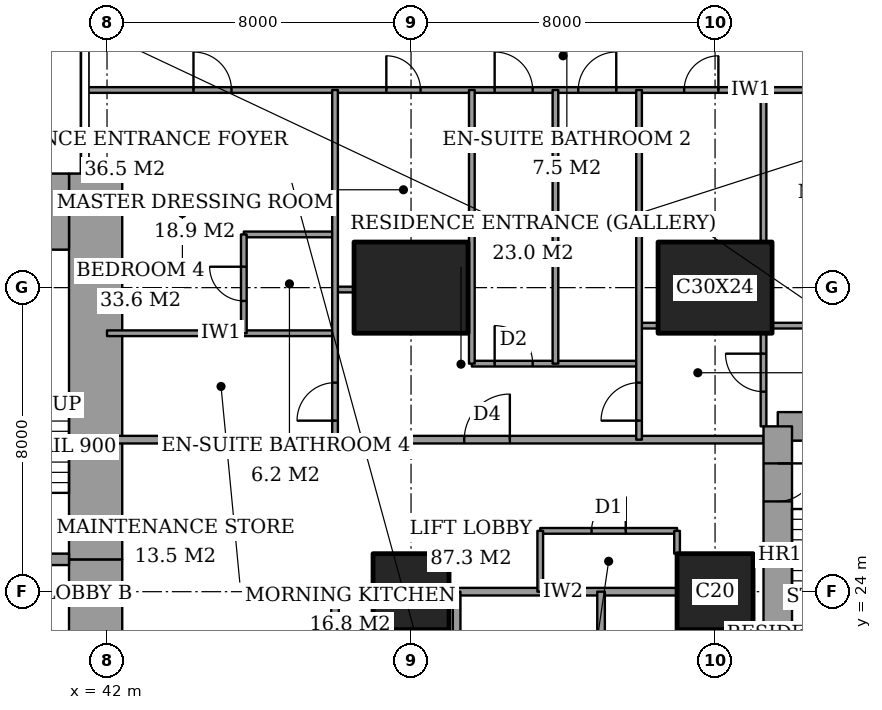
"""IFC4 building model, lengths in metres.
Left out: names, types, materials, properties, quantities, classifications, styles, units other than length and angle.
Written with IfcOpenShell. Run it as: python <this file> out.ifc"""

import sys

from ifc_helpers import new_model, si_unit, direction, frame, frame_2d, origin, origin_2d, place, context, subcontext, project, spatial, rectangle, extrude, element, fill, save


model = new_model("IFC4")
c1 = context("Model", 3, precision=1e-05, world=origin(), true_north=direction((0.0, 1.0)))
c2 = subcontext(c1, "Body", "Model", "MODEL_VIEW")
j1 = project(units=[si_unit("LENGTHUNIT", "METRE"), si_unit("PLANEANGLEUNIT", "RADIAN")], contexts=[c1])
p1 = place(None, origin())
s1 = spatial("IfcSite", under=j1, at=p1, CompositionType="ELEMENT")
p2 = place(p1, origin())
s2 = spatial("IfcBuilding", under=s1, at=p2, CompositionType="ELEMENT")
p3 = place(p2, frame((0.0, 0.0, 146.6)))
s3 = spatial("IfcBuildingStorey", under=s2, at=p3, CompositionType="ELEMENT", Elevation=146.6)
p4 = place(p3, frame((50.0, 24.0, 0.0), z_axis=(0.0, 0.0, 1.0), x_axis=(1.0, 0.0, 0.0)))
e1 = element("IfcColumn", 1, at=p4, inside=s3, PredefinedType="COLUMN", context=c2, shape_type="SweptSolid", body=[
    extrude(rectangle(XDim=2.0, YDim=2.0, at=origin_2d()), origin(), (0.0, 0.0, 1.0), 3.6),
])
p5 = place(p3, frame((50.0, 32.0, 0.0), z_axis=(0.0, 0.0, 1.0), x_axis=(1.0, 0.0, 0.0)))
e2 = element("IfcColumn", 2, at=p5, inside=s3, PredefinedType="COLUMN", context=c2, shape_type="SweptSolid", body=[
    extrude(rectangle(XDim=3.0, YDim=2.4, at=origin_2d()), origin(), (0.0, 0.0, 1.0), 3.6),
])
p6 = place(p3, frame((58.0, 24.0, 0.0), z_axis=(0.0, 0.0, 1.0), x_axis=(1.0, 0.0, 0.0)))
e3 = element("IfcColumn", 3, at=p6, inside=s3, PredefinedType="COLUMN", context=c2, shape_type="SweptSolid", body=[
    extrude(rectangle(XDim=2.0, YDim=2.0, at=origin_2d()), origin(), (0.0, 0.0, 1.0), 3.6),
])
p7 = place(p3, frame((58.0, 32.0, 0.0), z_axis=(0.0, 0.0, 1.0), x_axis=(1.0, 0.0, 0.0)))
e4 = element("IfcColumn", 4, at=p7, inside=s3, PredefinedType="COLUMN", context=c2, shape_type="SweptSolid", body=[
    extrude(rectangle(XDim=3.0, YDim=2.4, at=origin_2d()), origin(), (0.0, 0.0, 1.0), 3.6),
])
p8 = place(p3, frame((37.85, 34.0, 0.0), z_axis=(0.0, 0.0, 1.0), x_axis=(1.0, 0.0, 0.0)))
e5 = element("IfcWall", 5, at=p8, inside=s3, PredefinedType="SHEAR", context=c2, shape_type="SweptSolid", body=[
    extrude(rectangle(XDim=3.15, YDim=2.0, at=frame_2d((1.575, 0.0))), origin(), (0.0, 0.0, 1.0), 3.6),
])
p9 = place(p3, frame((41.7, 13.0, 0.0), z_axis=(0.0, 0.0, 1.0), x_axis=(0.0, 1.0, 0.0)))
e6 = element("IfcWall", 6, at=p9, inside=s3, PredefinedType="SHEAR", context=c2, shape_type="SweptSolid", body=[
    extrude(rectangle(XDim=11.85, YDim=1.4, at=frame_2d((5.925, 0.0))), origin(), (0.0, 0.0, 1.0), 3.6),
])
p10 = place(p9, frame((7.5, 0.0, 0.0)))
e7 = element("IfcOpeningElement", 7, at=p10, cuts=e6, PredefinedType="OPENING", context=c2, shape_type="SweptSolid", body=[
    extrude(rectangle(XDim=1.8, YDim=2.4, at=frame_2d((0.9, 1.2))), frame((0.0, 0.71, 0.0), z_axis=(0.0, -1.0, 0.0), x_axis=(1.0, 0.0, 0.0)), (0.0, 0.0, 1.0), 1.42),
])
p11 = place(p3, frame((41.7, 24.85, 0.0), z_axis=(0.0, 0.0, 1.0), x_axis=(0.0, 1.0, 0.0)))
e8 = element("IfcWall", 8, at=p11, inside=s3, PredefinedType="SHEAR", context=c2, shape_type="SweptSolid", body=[
    extrude(rectangle(XDim=10.15, YDim=1.4, at=frame_2d((5.075, 0.0))), origin(), (0.0, 0.0, 1.0), 3.6),
])
p12 = place(p3, frame((37.85, 24.85, 0.0), z_axis=(0.0, 0.0, 1.0), x_axis=(1.0, 0.0, 0.0)))
e9 = element("IfcWall", 9, at=p12, inside=s3, PredefinedType="SHEAR", context=c2, shape_type="SweptSolid", body=[
    extrude(rectangle(XDim=3.15, YDim=0.3, at=frame_2d((1.575, 0.0))), origin(), (0.0, 0.0, 1.0), 3.6),
])
p13 = place(p12, frame((0.95, 0.0, 0.0)))
e10 = element("IfcOpeningElement", 10, at=p13, cuts=e9, PredefinedType="OPENING", context=c2, shape_type="SweptSolid", body=[
    extrude(rectangle(XDim=1.0, YDim=2.1, at=frame_2d((0.5, 1.05))), frame((0.0, 0.16, 0.0), z_axis=(0.0, -1.0, 0.0), x_axis=(1.0, 0.0, 0.0)), (0.0, 0.0, 1.0), 0.32),
])
p14 = place(p3, frame((64.1, 28.35, 0.0), z_axis=(0.0, 0.0, 1.0), x_axis=(-1.0, 0.0, 0.0)))
e11 = element("IfcWall", 11, at=p14, inside=s3, PredefinedType="SHEAR", context=c2, shape_type="SweptSolid", body=[
    extrude(rectangle(XDim=4.45, YDim=0.75, at=frame_2d((2.225, 0.0))), origin(), (0.0, 0.0, 1.0), 3.6),
])
p15 = place(p3, frame((59.65, 28.35, 0.0), z_axis=(0.0, 0.0, 1.0), x_axis=(0.0, -1.0, 0.0)))
e12 = element("IfcWall", 12, at=p15, inside=s3, PredefinedType="SHEAR", context=c2, shape_type="SweptSolid", body=[
    extrude(rectangle(XDim=8.7, YDim=0.75, at=frame_2d((4.35, 0.0))), origin(), (0.0, 0.0, 1.0), 3.6),
])
p16 = place(p15, frame((0.975, 0.0, 0.0)))
e13 = element("IfcOpeningElement", 13, at=p16, cuts=e12, PredefinedType="OPENING", context=c2, shape_type="SweptSolid", body=[
    extrude(rectangle(XDim=1.0, YDim=2.1, at=frame_2d((0.5, 1.05))), frame((0.0, 0.385, 0.0), z_axis=(0.0, -1.0, 0.0), x_axis=(1.0, 0.0, 0.0)), (0.0, 0.0, 1.0), 0.77),
])
p17 = place(p3, frame((48.0, 24.0, 0.0), z_axis=(0.0, 0.0, 1.0), x_axis=(1.0, 0.0, 0.0)))
e14 = element("IfcWall", 14, at=p17, inside=s3, PredefinedType="PARTITIONING", context=c2, shape_type="SweptSolid", body=[
    extrude(rectangle(XDim=1.0, YDim=0.2, at=frame_2d((0.5, 0.0))), origin(), (0.0, 0.0, 1.0), 3.35),
])
p18 = place(p3, frame((51.0, 24.0, 0.0), z_axis=(0.0, 0.0, 1.0), x_axis=(1.0, 0.0, 0.0)))
e15 = element("IfcWall", 15, at=p18, inside=s3, PredefinedType="PARTITIONING", context=c2, shape_type="SweptSolid", body=[
    extrude(rectangle(XDim=6.0, YDim=0.2, at=frame_2d((3.0, 0.0))), origin(), (0.0, 0.0, 1.0), 3.35),
])
p19 = place(p3, frame((53.4, 25.6, 0.0), z_axis=(0.0, 0.0, 1.0), x_axis=(1.0, 0.0, 0.0)))
e16 = element("IfcWall", 16, at=p19, inside=s3, PredefinedType="PARTITIONING", context=c2, shape_type="SweptSolid", body=[
    extrude(rectangle(XDim=3.6, YDim=0.15, at=frame_2d((1.8, 0.0))), origin(), (0.0, 0.0, 1.0), 3.35),
])
p20 = place(p19, frame((1.35, 0.0, 0.0)))
e17 = element("IfcOpeningElement", 17, at=p20, cuts=e16, PredefinedType="OPENING", context=c2, shape_type="SweptSolid", body=[
    extrude(rectangle(XDim=0.9, YDim=2.1, at=frame_2d((0.45, 1.05))), frame((0.0, 0.085, 0.0), z_axis=(0.0, -1.0, 0.0), x_axis=(1.0, 0.0, 0.0)), (0.0, 0.0, 1.0), 0.17),
])
p21 = place(p3, frame((42.0, 28.0, 0.0), z_axis=(0.0, 0.0, 1.0), x_axis=(1.0, 0.0, 0.0)))
e18 = element("IfcWall", 18, at=p21, inside=s3, PredefinedType="PARTITIONING", context=c2, shape_type="SweptSolid", body=[
    extrude(rectangle(XDim=17.275, YDim=0.2, at=frame_2d((8.637, 0.0))), origin(), (0.0, 0.0, 1.0), 3.35),
])
p22 = place(p21, frame((9.4, 0.0, 0.0)))
e19 = element("IfcOpeningElement", 19, at=p22, cuts=e18, PredefinedType="OPENING", context=c2, shape_type="SweptSolid", body=[
    extrude(rectangle(XDim=1.2, YDim=2.4, at=frame_2d((0.6, 1.2))), frame((0.0, 0.11, 0.0), z_axis=(0.0, -1.0, 0.0), x_axis=(1.0, 0.0, 0.0)), (0.0, 0.0, 1.0), 0.22),
])
p23 = place(p3, frame((51.6, 30.0, 0.0), z_axis=(0.0, 0.0, 1.0), x_axis=(1.0, 0.0, 0.0)))
e20 = element("IfcWall", 20, at=p23, inside=s3, PredefinedType="PARTITIONING", context=c2, shape_type="SweptSolid", body=[
    extrude(rectangle(XDim=4.4, YDim=0.15, at=frame_2d((2.2, 0.0))), origin(), (0.0, 0.0, 1.0), 3.35),
])
p24 = place(p23, frame((0.6, 0.0, 0.0)))
e21 = element("IfcOpeningElement", 21, at=p24, cuts=e20, PredefinedType="OPENING", context=c2, shape_type="SweptSolid", body=[
    extrude(rectangle(XDim=1.0, YDim=2.1, at=frame_2d((0.5, 1.05))), frame((0.0, 0.085, 0.0), z_axis=(0.0, -1.0, 0.0), x_axis=(1.0, 0.0, 0.0)), (0.0, 0.0, 1.0), 0.17),
])
p25 = place(p3, frame((42.0, 30.8, 0.0), z_axis=(0.0, 0.0, 1.0), x_axis=(1.0, 0.0, 0.0)))
e22 = element("IfcWall", 22, at=p25, inside=s3, PredefinedType="PARTITIONING", context=c2, shape_type="SweptSolid", body=[
    extrude(rectangle(XDim=6.0, YDim=0.15, at=frame_2d((3.0, 0.0))), origin(), (0.0, 0.0, 1.0), 3.35),
])
p26 = place(p3, frame((56.0, 31.0, 0.0), z_axis=(0.0, 0.0, 1.0), x_axis=(1.0, 0.0, 0.0)))
e23 = element("IfcWall", 23, at=p26, inside=s3, PredefinedType="PARTITIONING", context=c2, shape_type="SweptSolid", body=[
    extrude(rectangle(XDim=0.5, YDim=0.15, at=frame_2d((0.25, 0.0))), origin(), (0.0, 0.0, 1.0), 3.35),
])
p27 = place(p3, frame((59.5, 31.0, 0.0), z_axis=(0.0, 0.0, 1.0), x_axis=(1.0, 0.0, 0.0)))
e24 = element("IfcWall", 24, at=p27, inside=s3, PredefinedType="PARTITIONING", context=c2, shape_type="SweptSolid", body=[
    extrude(rectangle(XDim=5.15, YDim=0.15, at=frame_2d((2.575, 0.0))), origin(), (0.0, 0.0, 1.0), 3.35),
])
p28 = place(p3, frame((48.0, 31.95, 0.0), z_axis=(0.0, 0.0, 1.0), x_axis=(1.0, 0.0, 0.0)))
e25 = element("IfcWall", 25, at=p28, inside=s3, PredefinedType="PARTITIONING", context=c2, shape_type="SweptSolid", body=[
    extrude(rectangle(XDim=0.5, YDim=0.15, at=frame_2d((0.25, 0.0))), origin(), (0.0, 0.0, 1.0), 2.634),
])
p29 = place(p3, frame((45.6, 33.4, 0.0), z_axis=(0.0, 0.0, 1.0), x_axis=(1.0, 0.0, 0.0)))
e26 = element("IfcWall", 26, at=p29, inside=s3, PredefinedType="PARTITIONING", context=c2, shape_type="SweptSolid", body=[
    extrude(rectangle(XDim=2.4, YDim=0.15, at=frame_2d((1.2, 0.0))), origin(), (0.0, 0.0, 1.0), 3.35),
])
p30 = place(p3, frame((41.439, 37.2, 0.0), z_axis=(0.0, 0.0, 1.0), x_axis=(1.0, 0.0, 0.0)))
e27 = element("IfcWall", 27, at=p30, inside=s3, PredefinedType="PARTITIONING", context=c2, shape_type="SweptSolid", body=[
    extrude(rectangle(XDim=25.011, YDim=0.15, at=frame_2d((12.505, 0.0))), origin(), (0.0, 0.0, 1.0), 3.35),
])
p31 = place(p30, frame((10.761, 0.0, 0.0)))
e28 = element("IfcOpeningElement", 28, at=p31, cuts=e27, PredefinedType="OPENING", context=c2, shape_type="SweptSolid", body=[
    extrude(rectangle(XDim=1.0, YDim=2.1, at=frame_2d((0.5, 1.05))), frame((0.0, 0.085, 0.0), z_axis=(0.0, -1.0, 0.0), x_axis=(1.0, 0.0, 0.0)), (0.0, 0.0, 1.0), 0.17),
])
p32 = place(p30, frame((20.924, 0.0, 0.0)))
e29 = element("IfcOpeningElement", 29, at=p32, cuts=e27, PredefinedType="OPENING", context=c2, shape_type="SweptSolid", body=[
    extrude(rectangle(XDim=1.0, YDim=2.1, at=frame_2d((0.5, 1.05))), frame((0.0, 0.085, 0.0), z_axis=(0.0, -1.0, 0.0), x_axis=(1.0, 0.0, 0.0)), (0.0, 0.0, 1.0), 0.17),
])
p33 = place(p30, frame((15.749, 0.0, 0.0)))
e30 = element("IfcOpeningElement", 30, at=p33, cuts=e27, PredefinedType="OPENING", context=c2, shape_type="SweptSolid", body=[
    extrude(rectangle(XDim=0.9, YDim=2.1, at=frame_2d((0.45, 1.05))), frame((0.0, 0.085, 0.0), z_axis=(0.0, -1.0, 0.0), x_axis=(1.0, 0.0, 0.0)), (0.0, 0.0, 1.0), 0.17),
])
p34 = place(p30, frame((12.961, 0.0, 0.0)))
e31 = element("IfcOpeningElement", 31, at=p34, cuts=e27, PredefinedType="OPENING", context=c2, shape_type="SweptSolid", body=[
    extrude(rectangle(XDim=1.0, YDim=2.1, at=frame_2d((0.5, 1.05))), frame((0.0, 0.085, 0.0), z_axis=(0.0, -1.0, 0.0), x_axis=(1.0, 0.0, 0.0)), (0.0, 0.0, 1.0), 0.17),
])
p35 = place(p30, frame((7.911, 0.0, 0.0)))
e32 = element("IfcOpeningElement", 32, at=p35, cuts=e27, PredefinedType="OPENING", context=c2, shape_type="SweptSolid", body=[
    extrude(rectangle(XDim=0.9, YDim=2.1, at=frame_2d((0.45, 1.05))), frame((0.0, 0.085, 0.0), z_axis=(0.0, -1.0, 0.0), x_axis=(1.0, 0.0, 0.0)), (0.0, 0.0, 1.0), 0.17),
])
p36 = place(p30, frame((2.836, 0.0, 0.0)))
e33 = element("IfcOpeningElement", 33, at=p36, cuts=e27, PredefinedType="OPENING", context=c2, shape_type="SweptSolid", body=[
    extrude(rectangle(XDim=1.0, YDim=2.1, at=frame_2d((0.5, 1.05))), frame((0.0, 0.085, 0.0), z_axis=(0.0, -1.0, 0.0), x_axis=(1.0, 0.0, 0.0)), (0.0, 0.0, 1.0), 0.17),
])
p37 = place(p3, frame((45.6, 30.8, 0.0), z_axis=(0.0, 0.0, 1.0), x_axis=(0.0, 1.0, 0.0)))
e34 = element("IfcWall", 34, at=p37, inside=s3, PredefinedType="PARTITIONING", context=c2, shape_type="SweptSolid", body=[
    extrude(rectangle(XDim=2.6, YDim=0.15, at=frame_2d((1.3, 0.0))), origin(), (0.0, 0.0, 1.0), 3.35),
])
p38 = place(p37, frame((0.85, 0.0, 0.0)))
e35 = element("IfcOpeningElement", 35, at=p38, cuts=e34, PredefinedType="OPENING", context=c2, shape_type="SweptSolid", body=[
    extrude(rectangle(XDim=0.9, YDim=2.1, at=frame_2d((0.45, 1.05))), frame((0.0, 0.085, 0.0), z_axis=(0.0, -1.0, 0.0), x_axis=(1.0, 0.0, 0.0)), (0.0, 0.0, 1.0), 0.17),
])
p39 = place(p3, frame((48.0, 19.0, 0.0), z_axis=(0.0, 0.0, 1.0), x_axis=(0.0, 1.0, 0.0)))
e36 = element("IfcWall", 36, at=p39, inside=s3, PredefinedType="PARTITIONING", context=c2, shape_type="SweptSolid", body=[
    extrude(rectangle(XDim=5.0, YDim=0.2, at=frame_2d((2.5, 0.0))), origin(), (0.0, 0.0, 1.0), 3.35),
])
p40 = place(p39, frame((2.4, 0.0, 0.0)))
e37 = element("IfcOpeningElement", 37, at=p40, cuts=e36, PredefinedType="OPENING", context=c2, shape_type="SweptSolid", body=[
    extrude(rectangle(XDim=1.2, YDim=2.4, at=frame_2d((0.6, 1.2))), frame((0.0, 0.11, 0.0), z_axis=(0.0, -1.0, 0.0), x_axis=(1.0, 0.0, 0.0)), (0.0, 0.0, 1.0), 0.22),
])
p41 = place(p3, frame((48.0, 28.0, 0.0), z_axis=(0.0, 0.0, 1.0), x_axis=(0.0, 1.0, 0.0)))
e38 = element("IfcWall", 38, at=p41, inside=s3, PredefinedType="PARTITIONING", context=c2, shape_type="SweptSolid", body=[
    extrude(rectangle(XDim=9.2, YDim=0.15, at=frame_2d((4.6, 0.0))), origin(), (0.0, 0.0, 1.0), 3.35),
])
p42 = place(p41, frame((0.5, 0.0, 0.0)))
e39 = element("IfcOpeningElement", 39, at=p42, cuts=e38, PredefinedType="OPENING", context=c2, shape_type="SweptSolid", body=[
    extrude(rectangle(XDim=1.0, YDim=2.1, at=frame_2d((0.5, 1.05))), frame((0.0, 0.085, 0.0), z_axis=(0.0, -1.0, 0.0), x_axis=(1.0, 0.0, 0.0)), (0.0, 0.0, 1.0), 0.17),
])
p43 = place(p3, frame((51.2, 21.6, 0.0), z_axis=(0.0, 0.0, 1.0), x_axis=(0.0, 1.0, 0.0)))
e40 = element("IfcWall", 40, at=p43, inside=s3, PredefinedType="PARTITIONING", context=c2, shape_type="SweptSolid", body=[
    extrude(rectangle(XDim=2.4, YDim=0.2, at=frame_2d((1.2, 0.0))), origin(), (0.0, 0.0, 1.0), 3.35),
])
p44 = place(p3, frame((51.6, 30.0, 0.0), z_axis=(0.0, 0.0, 1.0), x_axis=(0.0, 1.0, 0.0)))
e41 = element("IfcWall", 41, at=p44, inside=s3, PredefinedType="PARTITIONING", context=c2, shape_type="SweptSolid", body=[
    extrude(rectangle(XDim=7.2, YDim=0.15, at=frame_2d((3.6, 0.0))), origin(), (0.0, 0.0, 1.0), 3.35),
])
p45 = place(p3, frame((53.4, 24.0, 0.0), z_axis=(0.0, 0.0, 1.0), x_axis=(0.0, 1.0, 0.0)))
e42 = element("IfcWall", 42, at=p45, inside=s3, PredefinedType="PARTITIONING", context=c2, shape_type="SweptSolid", body=[
    extrude(rectangle(XDim=1.6, YDim=0.15, at=frame_2d((0.8, 0.0))), origin(), (0.0, 0.0, 1.0), 3.35),
])
p46 = place(p3, frame((53.8, 30.0, 0.0), z_axis=(0.0, 0.0, 1.0), x_axis=(0.0, 1.0, 0.0)))
e43 = element("IfcWall", 43, at=p46, inside=s3, PredefinedType="PARTITIONING", context=c2, shape_type="SweptSolid", body=[
    extrude(rectangle(XDim=7.2, YDim=0.15, at=frame_2d((3.6, 0.0))), origin(), (0.0, 0.0, 1.0), 3.35),
])
p47 = place(p3, frame((55.0, 21.6, 0.0), z_axis=(0.0, 0.0, 1.0), x_axis=(0.0, 1.0, 0.0)))
e44 = element("IfcWall", 44, at=p47, inside=s3, PredefinedType="PARTITIONING", context=c2, shape_type="SweptSolid", body=[
    extrude(rectangle(XDim=2.4, YDim=0.2, at=frame_2d((1.2, 0.0))), origin(), (0.0, 0.0, 1.0), 3.35),
])
p48 = place(p3, frame((56.0, 28.0, 0.0), z_axis=(0.0, 0.0, 1.0), x_axis=(0.0, 1.0, 0.0)))
e45 = element("IfcWall", 45, at=p48, inside=s3, PredefinedType="PARTITIONING", context=c2, shape_type="SweptSolid", body=[
    extrude(rectangle(XDim=9.2, YDim=0.15, at=frame_2d((4.6, 0.0))), origin(), (0.0, 0.0, 1.0), 3.35),
])
p49 = place(p48, frame((0.5, 0.0, 0.0)))
e46 = element("IfcOpeningElement", 46, at=p49, cuts=e45, PredefinedType="OPENING", context=c2, shape_type="SweptSolid", body=[
    extrude(rectangle(XDim=1.0, YDim=2.1, at=frame_2d((0.5, 1.05))), frame((0.0, 0.085, 0.0), z_axis=(0.0, -1.0, 0.0), x_axis=(1.0, 0.0, 0.0)), (0.0, 0.0, 1.0), 0.17),
])
p50 = place(p3, frame((57.0, 25.0, 0.0), z_axis=(0.0, 0.0, 1.0), x_axis=(0.0, 1.0, 0.0)))
e47 = element("IfcWall", 47, at=p50, inside=s3, PredefinedType="PARTITIONING", context=c2, shape_type="SweptSolid", body=[
    extrude(rectangle(XDim=0.6, YDim=0.15, at=frame_2d((0.3, 0.0))), origin(), (0.0, 0.0, 1.0), 3.35),
])
p51 = place(p3, frame((59.275, 28.35, 0.0), z_axis=(0.0, 0.0, 1.0), x_axis=(0.0, 1.0, 0.0)))
e48 = element("IfcWall", 48, at=p51, inside=s3, PredefinedType="PARTITIONING", context=c2, shape_type="SweptSolid", body=[
    extrude(rectangle(XDim=2.45, YDim=0.15, at=frame_2d((1.225, 0.0))), origin(), (0.0, 0.0, 1.0), 3.35),
])
p52 = place(p51, frame((0.913, 0.0, 0.0)))
e49 = element("IfcOpeningElement", 49, at=p52, cuts=e48, PredefinedType="OPENING", context=c2, shape_type="SweptSolid", body=[
    extrude(rectangle(XDim=1.0, YDim=2.1, at=frame_2d((0.5, 1.05))), frame((0.0, 0.085, 0.0), z_axis=(0.0, -1.0, 0.0), x_axis=(1.0, 0.0, 0.0)), (0.0, 0.0, 1.0), 0.17),
])
p53 = place(p3, frame((59.275, 33.2, 0.0), z_axis=(0.0, 0.0, 1.0), x_axis=(0.0, 1.0, 0.0)))
e50 = element("IfcWall", 50, at=p53, inside=s3, PredefinedType="PARTITIONING", context=c2, shape_type="SweptSolid", body=[
    extrude(rectangle(XDim=4.0, YDim=0.15, at=frame_2d((2.0, 0.0))), origin(), (0.0, 0.0, 1.0), 3.35),
])
p54 = place(p31, origin())
e51 = element("IfcDoor", 51, at=p54, inside=s3, OperationType="SINGLE_SWING_RIGHT", PredefinedType="DOOR", context=c2, shape_type="SweptSolid", body=[
    extrude(rectangle(XDim=1.0, YDim=2.1, at=frame_2d((0.5, 1.05))), frame((0.0, 0.025, 0.0), z_axis=(0.0, -1.0, 0.0), x_axis=(1.0, 0.0, 0.0)), (0.0, 0.0, 1.0), 0.05),
])
fill(e28, e51)
p55 = place(p52, origin())
e52 = element("IfcDoor", 52, at=p55, inside=s3, OperationType="SINGLE_SWING_LEFT", PredefinedType="DOOR", context=c2, shape_type="SweptSolid", body=[
    extrude(rectangle(XDim=1.0, YDim=2.1, at=frame_2d((0.5, 1.05))), frame((0.0, 0.025, 0.0), z_axis=(0.0, -1.0, 0.0), x_axis=(1.0, 0.0, 0.0)), (0.0, 0.0, 1.0), 0.05),
])
fill(e49, e52)
p56 = place(p33, origin())
e53 = element("IfcDoor", 53, at=p56, inside=s3, OperationType="SINGLE_SWING_LEFT", PredefinedType="DOOR", context=c2, shape_type="SweptSolid", body=[
    extrude(rectangle(XDim=0.9, YDim=2.1, at=frame_2d((0.45, 1.05))), frame((0.0, 0.025, 0.0), z_axis=(0.0, -1.0, 0.0), x_axis=(1.0, 0.0, 0.0)), (0.0, 0.0, 1.0), 0.05),
])
fill(e30, e53)
p57 = place(p49, origin())
e54 = element("IfcDoor", 54, at=p57, inside=s3, OperationType="SINGLE_SWING_RIGHT", PredefinedType="DOOR", context=c2, shape_type="SweptSolid", body=[
    extrude(rectangle(XDim=1.0, YDim=2.1, at=frame_2d((0.5, 1.05))), frame((0.0, 0.025, 0.0), z_axis=(0.0, -1.0, 0.0), x_axis=(1.0, 0.0, 0.0)), (0.0, 0.0, 1.0), 0.05),
])
fill(e46, e54)
p58 = place(p22, origin())
e55 = element("IfcDoor", 55, at=p58, inside=s3, OperationType="SINGLE_SWING_LEFT", PredefinedType="DOOR", context=c2, shape_type="SweptSolid", body=[
    extrude(rectangle(XDim=1.2, YDim=2.4, at=frame_2d((0.6, 1.2))), frame((0.0, 0.025, 0.0), z_axis=(0.0, -1.0, 0.0), x_axis=(1.0, 0.0, 0.0)), (0.0, 0.0, 1.0), 0.05),
])
fill(e19, e55)
p59 = place(p34, origin())
e56 = element("IfcDoor", 56, at=p59, inside=s3, OperationType="SINGLE_SWING_LEFT", PredefinedType="DOOR", context=c2, shape_type="SweptSolid", body=[
    extrude(rectangle(XDim=1.0, YDim=2.1, at=frame_2d((0.5, 1.05))), frame((0.0, 0.025, 0.0), z_axis=(0.0, -1.0, 0.0), x_axis=(1.0, 0.0, 0.0)), (0.0, 0.0, 1.0), 0.05),
])
fill(e31, e56)
p60 = place(p24, origin())
e57 = element("IfcDoor", 57, at=p60, inside=s3, OperationType="SINGLE_SWING_RIGHT", PredefinedType="DOOR", context=c2, shape_type="SweptSolid", body=[
    extrude(rectangle(XDim=1.0, YDim=2.1, at=frame_2d((0.5, 1.05))), frame((0.0, 0.025, 0.0), z_axis=(0.0, -1.0, 0.0), x_axis=(1.0, 0.0, 0.0)), (0.0, 0.0, 1.0), 0.05),
])
fill(e21, e57)
p61 = place(p35, origin())
e58 = element("IfcDoor", 58, at=p61, inside=s3, OperationType="SINGLE_SWING_RIGHT", PredefinedType="DOOR", context=c2, shape_type="SweptSolid", body=[
    extrude(rectangle(XDim=0.9, YDim=2.1, at=frame_2d((0.45, 1.05))), frame((0.0, 0.025, 0.0), z_axis=(0.0, -1.0, 0.0), x_axis=(1.0, 0.0, 0.0)), (0.0, 0.0, 1.0), 0.05),
])
fill(e32, e58)
p62 = place(p38, origin())
e59 = element("IfcDoor", 59, at=p62, inside=s3, OperationType="SINGLE_SWING_LEFT", PredefinedType="DOOR", context=c2, shape_type="SweptSolid", body=[
    extrude(rectangle(XDim=0.9, YDim=2.1, at=frame_2d((0.45, 1.05))), frame((0.0, 0.025, 0.0), z_axis=(0.0, -1.0, 0.0), x_axis=(1.0, 0.0, 0.0)), (0.0, 0.0, 1.0), 0.05),
])
fill(e35, e59)
p63 = place(p36, origin())
e60 = element("IfcDoor", 60, at=p63, inside=s3, OperationType="SINGLE_SWING_RIGHT", PredefinedType="DOOR", context=c2, shape_type="SweptSolid", body=[
    extrude(rectangle(XDim=1.0, YDim=2.1, at=frame_2d((0.5, 1.05))), frame((0.0, 0.025, 0.0), z_axis=(0.0, -1.0, 0.0), x_axis=(1.0, 0.0, 0.0)), (0.0, 0.0, 1.0), 0.05),
])
fill(e33, e60)
p64 = place(p42, origin())
e61 = element("IfcDoor", 61, at=p64, inside=s3, OperationType="SINGLE_SWING_RIGHT", PredefinedType="DOOR", context=c2, shape_type="SweptSolid", body=[
    extrude(rectangle(XDim=1.0, YDim=2.1, at=frame_2d((0.5, 1.05))), frame((0.0, 0.025, 0.0), z_axis=(0.0, -1.0, 0.0), x_axis=(1.0, 0.0, 0.0)), (0.0, 0.0, 1.0), 0.05),
])
fill(e39, e61)
p65 = place(p20, origin())
e62 = element("IfcDoor", 62, at=p65, inside=s3, OperationType="SINGLE_SWING_LEFT", PredefinedType="DOOR", context=c2, shape_type="SweptSolid", body=[
    extrude(rectangle(XDim=0.9, YDim=2.1, at=frame_2d((0.45, 1.05))), frame((0.0, 0.025, 0.0), z_axis=(0.0, -1.0, 0.0), x_axis=(1.0, 0.0, 0.0)), (0.0, 0.0, 1.0), 0.05),
])
fill(e17, e62)
p66 = place(p16, origin())
e63 = element("IfcDoor", 63, at=p66, inside=s3, OperationType="SINGLE_SWING_RIGHT", PredefinedType="DOOR", context=c2, shape_type="SweptSolid", body=[
    extrude(rectangle(XDim=1.0, YDim=2.1, at=frame_2d((0.5, 1.05))), frame((0.0, 0.025, 0.0), z_axis=(0.0, -1.0, 0.0), x_axis=(1.0, 0.0, 0.0)), (0.0, 0.0, 1.0), 0.05),
])
fill(e13, e63)
save(model, sys.argv[1])
